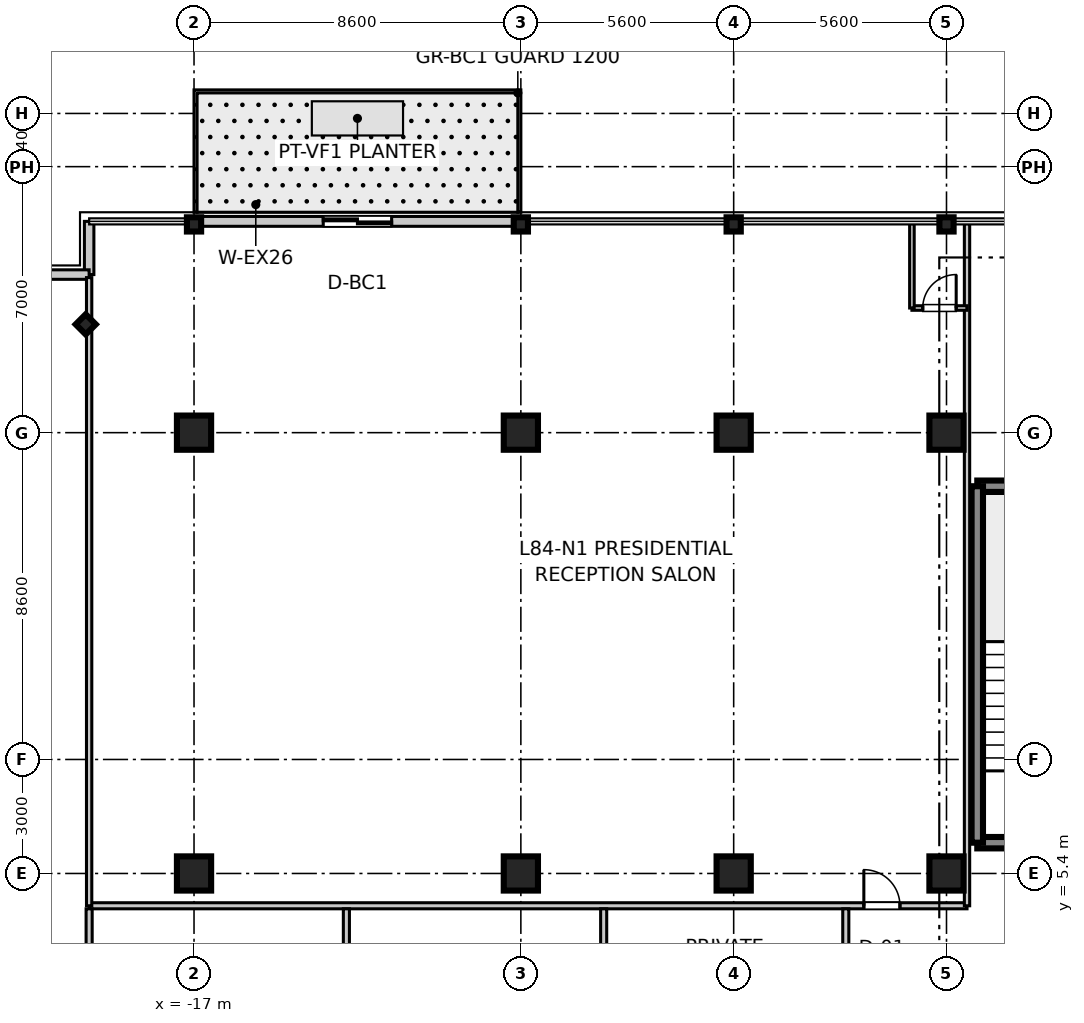
"""IFC4 building model, lengths in metres.
Left out: names, types, materials, properties, quantities, classifications, styles, units other than length and angle.
Written with IfcOpenShell. Run it as: python <this file> out.ifc"""

import sys

from ifc_helpers import new_model, si_unit, direction, frame, frame_2d, origin, origin_2d, place, context, subcontext, project, spatial, rectangle, i_section, extrude, source, transform, mapped, element, fill, save


model = new_model("IFC4")
c1 = context("Model", 3, precision=1e-05, world=origin(), true_north=direction((0.0, 1.0)))
c2 = subcontext(c1, "Body", "Model", "MODEL_VIEW")
j1 = project(units=[si_unit("LENGTHUNIT", "METRE"), si_unit("PLANEANGLEUNIT", "RADIAN")], contexts=[c1])
p1 = place(None, origin())
s1 = spatial("IfcSite", under=j1, at=p1, CompositionType="ELEMENT")
p2 = place(p1, origin())
s2 = spatial("IfcBuilding", under=s1, at=p2, CompositionType="ELEMENT")
p3 = place(p2, frame((0.0, 0.0, 327.15)))
s3 = spatial("IfcBuildingStorey", under=s2, at=p3, CompositionType="ELEMENT", Elevation=327.15)
m1 = source(origin(), c2, "Body", "SweptSolid", [
    extrude(rectangle(XDim=0.9, YDim=0.9, at=origin_2d()), origin(), (0.0, 0.0, 1.0), 3.755),
])
for number, where, z_axis, x_axis in (
    (1, (-17.0, 5.4, 0.0), (0.0, 0.0, 1.0), (1.0, 0.0, 0.0)),
    (2, (-17.0, 17.0, 0.0), (0.0, 0.0, 1.0), (1.0, 0.0, 0.0)),
    (3, (-8.4, 5.4, 0.0), (0.0, 0.0, 1.0), (1.0, 0.0, 0.0)),
    (4, (-8.4, 17.0, 0.0), (0.0, 0.0, 1.0), (1.0, 0.0, 0.0)),
    (5, (-2.8, 5.4, 0.0), (0.0, 0.0, 1.0), (1.0, 0.0, 0.0)),
    (6, (-2.8, 17.0, 0.0), (0.0, 0.0, 1.0), (1.0, 0.0, 0.0)),
    (7, (2.8, 5.4, 0.0), (0.0, 0.0, 1.0), (1.0, 0.0, 0.0)),
    (8, (2.8, 17.0, 0.0), (0.0, 0.0, 1.0), (1.0, 0.0, 0.0)),
):
    element("IfcColumn", number, at=place(p3, frame(where, z_axis=z_axis, x_axis=x_axis)), inside=s3, PredefinedType="COLUMN", context=c2, shape_type="MappedRepresentation", body=[
        mapped(m1, transform((0.0, 0.0, 0.0), scale=1.0)),
    ])
m2 = source(origin(), c2, "Body", "SweptSolid", [
    extrude(i_section(OverallWidth=0.374, OverallDepth=0.374, WebThickness=0.014, FlangeThickness=0.023, at=origin_2d()), origin(), (0.0, 0.0, 1.0), 3.755),
])
for number, where, z_axis, x_axis in (
    (9, (-17.0, 22.48, 0.0), (0.0, 0.0, 1.0), (0.0, 1.0, 0.0)),
    (10, (-8.4, 22.48, 0.0), (0.0, 0.0, 1.0), (0.0, 1.0, 0.0)),
    (11, (-2.8, 22.48, 0.0), (0.0, 0.0, 1.0), (0.0, 1.0, 0.0)),
    (12, (2.8, 22.48, 0.0), (0.0, 0.0, 1.0), (0.0, 1.0, 0.0)),
    (13, (-19.85, 19.85, 0.0), (0.0, 0.0, 1.0), (0.707, 0.707, 0.0)),
):
    element("IfcColumn", number, at=place(p3, frame(where, z_axis=z_axis, x_axis=x_axis)), inside=s3, PredefinedType="COLUMN", context=c2, shape_type="MappedRepresentation", body=[
        mapped(m2, transform((0.0, 0.0, 0.0), scale=1.0)),
    ])
m3 = source(origin(), c2, "Body", "SweptSolid", [
    extrude(rectangle(XDim=3.98, YDim=0.3, at=frame_2d((1.99, 0.0))), origin(), (0.0, 0.0, 1.0), 3.5),
])
for number, where, z_axis, x_axis in (
    (14, (3.61, 6.21, 0.0), (0.0, 0.0, 1.0), (1.0, 0.0, 0.0)),
    (15, (3.61, 15.59, 0.0), (0.0, 0.0, 1.0), (1.0, 0.0, 0.0)),
):
    element("IfcWall", number, at=place(p3, frame(where, z_axis=z_axis, x_axis=x_axis)), inside=s3, PredefinedType="SHEAR", context=c2, shape_type="MappedRepresentation", body=[
        mapped(m3, transform((0.0, 0.0, 0.0), scale=1.0)),
    ])
m4 = source(origin(), c2, "Body", "SweptSolid", [
    extrude(rectangle(XDim=9.38, YDim=0.3, at=frame_2d((4.69, 0.0))), origin(), (0.0, 0.0, 1.0), 3.5),
])
p4 = place(p3, frame((3.61, 6.21, 0.0), z_axis=(0.0, 0.0, 1.0), x_axis=(0.0, 1.0, 0.0)))
e16 = element("IfcWall", 16, at=p4, inside=s3, PredefinedType="SHEAR", context=c2, shape_type="MappedRepresentation", body=[
    mapped(m4, transform((0.0, 0.0, 0.0), scale=1.0)),
])
m5 = source(origin(), c2, "Body", "SweptSolid", [
    extrude(rectangle(XDim=1.4, YDim=0.25, at=frame_2d((0.7, 0.0))), origin(), (0.0, 0.0, 1.0), 3.5),
])
p5 = place(p3, frame((-19.76, 21.16, 0.0), z_axis=(0.0, 0.0, 1.0), x_axis=(0.0, 1.0, 0.0)))
e17 = element("IfcWall", 17, at=p5, inside=s3, PredefinedType="STANDARD", context=c2, shape_type="MappedRepresentation", body=[
    mapped(m5, transform((0.0, 0.0, 0.0), scale=1.0)),
])
m6 = source(origin(), c2, "Body", "SweptSolid", [
    extrude(rectangle(XDim=1.4, YDim=0.25, at=frame_2d((0.7, 0.0))), origin(), (0.0, 0.0, 1.0), 3.5),
])
p6 = place(p3, frame((-21.16, 21.16, 0.0), z_axis=(0.0, 0.0, 1.0), x_axis=(1.0, 0.0, 0.0)))
e18 = element("IfcWall", 18, at=p6, inside=s3, PredefinedType="STANDARD", context=c2, shape_type="MappedRepresentation", body=[
    mapped(m6, transform((0.0, 0.0, 0.0), scale=1.0)),
])
m7 = source(origin(), c2, "Body", "SweptSolid", [
    extrude(rectangle(XDim=8.6, YDim=0.26, at=frame_2d((4.3, 0.0))), origin(), (0.0, 0.0, 1.0), 2.98),
])
p7 = place(p3, frame((-17.0, 22.56, 0.0), z_axis=(0.0, 0.0, 1.0), x_axis=(1.0, 0.0, 0.0)))
e19 = element("IfcWall", 19, at=p7, inside=s3, PredefinedType="STANDARD", context=c2, shape_type="MappedRepresentation", body=[
    mapped(m7, transform((0.0, 0.0, 0.0), scale=1.0)),
])
p8 = place(p7, frame((3.4, 0.0, 0.0)))
e20 = element("IfcOpeningElement", 20, at=p8, cuts=e19, PredefinedType="OPENING", context=c2, shape_type="SweptSolid", body=[
    extrude(rectangle(XDim=1.8, YDim=2.25, at=frame_2d((0.9, 1.125))), frame((0.0, 0.14, 0.0), z_axis=(0.0, -1.0, 0.0), x_axis=(1.0, 0.0, 0.0)), (0.0, 0.0, 1.0), 0.28),
])
m8 = source(origin(), c2, "Body", "SweptSolid", [
    extrude(rectangle(XDim=23.1, YDim=0.16, at=frame_2d((11.55, 0.0))), origin(), (0.0, 0.0, 1.0), 2.84),
])
p9 = place(p3, frame((-19.76, 4.55, 0.0), z_axis=(0.0, 0.0, 1.0), x_axis=(1.0, 0.0, 0.0)))
e21 = element("IfcWall", 21, at=p9, inside=s3, PredefinedType="PARTITIONING", context=c2, shape_type="MappedRepresentation", body=[
    mapped(m8, transform((0.0, 0.0, 0.0), scale=1.0)),
])
p10 = place(p9, frame((20.385, 0.0, 0.0)))
e22 = element("IfcOpeningElement", 22, at=p10, cuts=e21, PredefinedType="OPENING", context=c2, shape_type="SweptSolid", body=[
    extrude(rectangle(XDim=0.95, YDim=2.1, at=frame_2d((0.475, 1.05))), frame((0.0, 0.09, 0.0), z_axis=(0.0, -1.0, 0.0), x_axis=(1.0, 0.0, 0.0)), (0.0, 0.0, 1.0), 0.18),
])
m9 = source(origin(), c2, "Body", "SweptSolid", [
    extrude(rectangle(XDim=16.53, YDim=0.14, at=frame_2d((8.265, 0.0))), origin(), (0.0, 0.0, 1.0), 2.84),
])
p11 = place(p3, frame((-19.76, 4.55, 0.0), z_axis=(0.0, 0.0, 1.0), x_axis=(0.0, 1.0, 0.0)))
e23 = element("IfcWall", 23, at=p11, inside=s3, PredefinedType="PARTITIONING", context=c2, shape_type="MappedRepresentation", body=[
    mapped(m9, transform((0.0, 0.0, 0.0), scale=1.0)),
])
m10 = source(origin(), c2, "Body", "SweptSolid", [
    extrude(rectangle(XDim=17.95, YDim=0.14, at=frame_2d((8.975, 0.0))), origin(), (0.0, 0.0, 1.0), 2.84),
])
p12 = place(p3, frame((3.34, 4.55, 0.0), z_axis=(0.0, 0.0, 1.0), x_axis=(0.0, 1.0, 0.0)))
e24 = element("IfcWall", 24, at=p12, inside=s3, PredefinedType="PARTITIONING", context=c2, shape_type="MappedRepresentation", body=[
    mapped(m10, transform((0.0, 0.0, 0.0), scale=1.0)),
])
m11 = source(origin(), c2, "Body", "SweptSolid", [
    extrude(rectangle(XDim=1.45, YDim=0.12, at=frame_2d((0.725, 0.0))), origin(), (0.0, 0.0, 1.0), 2.84),
])
p13 = place(p3, frame((1.89, 20.28, 0.0), z_axis=(0.0, 0.0, 1.0), x_axis=(1.0, 0.0, 0.0)))
e25 = element("IfcWall", 25, at=p13, inside=s3, PredefinedType="PARTITIONING", context=c2, shape_type="MappedRepresentation", body=[
    mapped(m11, transform((0.0, 0.0, 0.0), scale=1.0)),
])
p14 = place(p13, frame((0.285, 0.0, 0.0)))
e26 = element("IfcOpeningElement", 26, at=p14, cuts=e25, PredefinedType="OPENING", context=c2, shape_type="SweptSolid", body=[
    extrude(rectangle(XDim=0.88, YDim=2.1, at=frame_2d((0.44, 1.05))), frame((0.0, 0.07, 0.0), z_axis=(0.0, -1.0, 0.0), x_axis=(1.0, 0.0, 0.0)), (0.0, 0.0, 1.0), 0.14),
])
m12 = source(origin(), c2, "Body", "SweptSolid", [
    extrude(rectangle(XDim=2.22, YDim=0.12, at=frame_2d((1.11, 0.0))), origin(), (0.0, 0.0, 1.0), 2.84),
])
p15 = place(p3, frame((1.89, 20.28, 0.0), z_axis=(0.0, 0.0, 1.0), x_axis=(0.0, 1.0, 0.0)))
e27 = element("IfcWall", 27, at=p15, inside=s3, PredefinedType="PARTITIONING", context=c2, shape_type="MappedRepresentation", body=[
    mapped(m12, transform((0.0, 0.0, 0.0), scale=1.0)),
])
m13 = source(origin(), c2, "Body", "SweptSolid", [
    extrude(rectangle(XDim=6.89, YDim=0.16, at=frame_2d((3.445, 0.0))), origin(), (0.0, 0.0, 1.0), 2.84),
])
for number, where, z_axis, x_axis in (
    (28, (-19.76, -2.42, 0.0), (0.0, 0.0, 1.0), (0.0, 1.0, 0.0)),
    (29, (-12.991, -2.42, 0.0), (0.0, 0.0, 1.0), (0.0, 1.0, 0.0)),
    (30, (-6.221, -2.42, 0.0), (0.0, 0.0, 1.0), (0.0, 1.0, 0.0)),
):
    element("IfcWall", number, at=place(p3, frame(where, z_axis=z_axis, x_axis=x_axis)), inside=s3, PredefinedType="PARTITIONING", context=c2, shape_type="MappedRepresentation", body=[
        mapped(m13, transform((0.0, 0.0, 0.0), scale=1.0)),
    ])
m14 = source(origin(), c2, "Body", "SweptSolid", [
    extrude(rectangle(XDim=3.47, YDim=0.16, at=frame_2d((1.735, 0.0))), origin(), (0.0, 0.0, 1.0), 2.84),
])
p16 = place(p3, frame((0.15, 1.0, 0.0), z_axis=(0.0, 0.0, 1.0), x_axis=(0.0, 1.0, 0.0)))
e31 = element("IfcWall", 31, at=p16, inside=s3, PredefinedType="PARTITIONING", context=c2, shape_type="MappedRepresentation", body=[
    mapped(m14, transform((0.0, 0.0, 0.0), scale=1.0)),
])
p17 = place(p16, frame((0.481, 0.0, 0.0)))
e32 = element("IfcOpeningElement", 32, at=p17, cuts=e31, PredefinedType="OPENING", context=c2, shape_type="SweptSolid", body=[
    extrude(rectangle(XDim=0.88, YDim=2.1, at=frame_2d((0.44, 1.05))), frame((0.0, 0.09, 0.0), z_axis=(0.0, -1.0, 0.0), x_axis=(1.0, 0.0, 0.0)), (0.0, 0.0, 1.0), 0.18),
])
m15 = source(origin(), c2, "Body", "SweptSolid", [
    extrude(rectangle(XDim=0.88, YDim=2.1, at=frame_2d((0.44, 1.05))), frame((0.0, 0.025, 0.0), z_axis=(0.0, -1.0, 0.0), x_axis=(1.0, 0.0, 0.0)), (0.0, 0.0, 1.0), 0.05),
])
p18 = place(p14, origin())
e33 = element("IfcDoor", 33, at=p18, inside=s3, OperationType="SINGLE_SWING_RIGHT", PredefinedType="DOOR", context=c2, shape_type="MappedRepresentation", body=[
    mapped(m15, transform((0.0, 0.0, 0.0), scale=1.0)),
])
fill(e26, e33)
m16 = source(origin(), c2, "Body", "SweptSolid", [
    extrude(rectangle(XDim=0.95, YDim=2.1, at=frame_2d((0.475, 1.05))), frame((0.0, 0.025, 0.0), z_axis=(0.0, -1.0, 0.0), x_axis=(1.0, 0.0, 0.0)), (0.0, 0.0, 1.0), 0.05),
])
p19 = place(p10, origin())
e34 = element("IfcDoor", 34, at=p19, inside=s3, OperationType="SINGLE_SWING_LEFT", PredefinedType="DOOR", context=c2, shape_type="MappedRepresentation", body=[
    mapped(m16, transform((0.0, 0.0, 0.0), scale=1.0)),
])
fill(e22, e34)
m17 = source(origin(), c2, "Body", "SweptSolid", [
    extrude(rectangle(XDim=1.8, YDim=2.25, at=frame_2d((0.9, 1.125))), frame((0.0, 0.025, 0.0), z_axis=(0.0, -1.0, 0.0), x_axis=(1.0, 0.0, 0.0)), (0.0, 0.0, 1.0), 0.05),
])
p20 = place(p8, origin())
e35 = element("IfcDoor", 35, at=p20, inside=s3, OperationType="DOUBLE_DOOR_SLIDING", PredefinedType="DOOR", context=c2, shape_type="MappedRepresentation", body=[
    mapped(m17, transform((0.0, 0.0, 0.0), scale=1.0)),
])
fill(e20, e35)
save(model, sys.argv[1])
